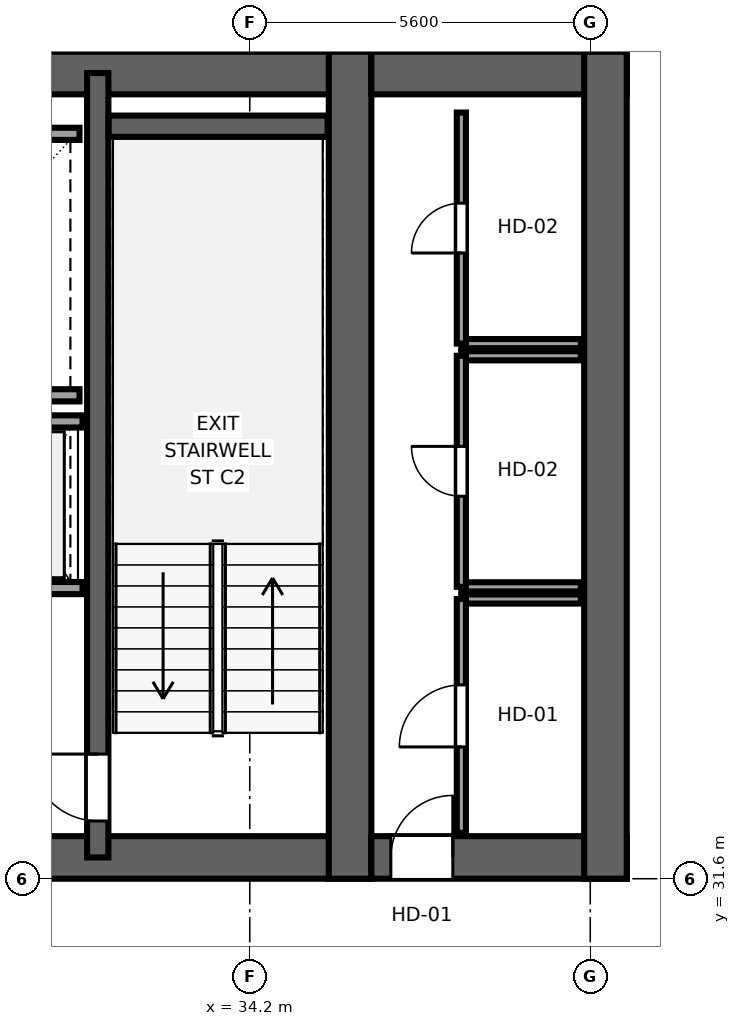
"""IFC4 building model, lengths in metres.
Left out: names, types, materials, properties, quantities, classifications, styles, units other than length and angle.
Written with IfcOpenShell. Run it as: python <this file> out.ifc"""

import sys

from ifc_helpers import new_model, si_unit, direction, frame, frame_2d, origin, place, context, subcontext, project, spatial, rectangle, extrude, source, transform, mapped, element, fill, save


model = new_model("IFC4")
c1 = context("Model", 3, precision=1e-05, world=origin(), true_north=direction((0.0, 1.0)))
c2 = subcontext(c1, "Body", "Model", "MODEL_VIEW")
j1 = project(units=[si_unit("LENGTHUNIT", "METRE"), si_unit("PLANEANGLEUNIT", "RADIAN")], contexts=[c1])
p1 = place(None, origin())
s1 = spatial("IfcSite", under=j1, at=p1, CompositionType="ELEMENT")
p2 = place(p1, origin())
s2 = spatial("IfcBuilding", under=s1, at=p2, CompositionType="ELEMENT")
p3 = place(p2, frame((0.0, 0.0, 100.9)))
s3 = spatial("IfcBuildingStorey", under=s2, at=p3, CompositionType="ELEMENT", Elevation=100.9)
p4 = place(p3, frame((9.8, 31.95, 0.0), z_axis=(0.0, 0.0, 1.0), x_axis=(1.0, 0.0, 0.0)))
e1 = element("IfcWall", 1, at=p4, inside=s3, PredefinedType="SHEAR", context=c2, shape_type="SweptSolid", body=[
    extrude(rectangle(XDim=26.4, YDim=0.7, at=frame_2d((13.2, 0.0))), origin(), (0.0, 0.0, 1.0), 3.55),
])
p5 = place(p4, frame((6.32, 0.0, 0.0), z_axis=(0.0, 0.0, 1.0), x_axis=(-1.0, 0.0, 0.0)))
e2 = element("IfcOpeningElement", 2, at=p5, cuts=e1, PredefinedType="OPENING", context=c2, shape_type="SweptSolid", body=[
    extrude(rectangle(XDim=1.5, YDim=2.04, at=frame_2d((0.75, 1.02))), frame((0.0, 0.36, 0.0), z_axis=(0.0, -1.0, 0.0), x_axis=(1.0, 0.0, 0.0)), (0.0, 0.0, 1.0), 0.72),
])
p6 = place(p4, frame((13.95, 0.0, 0.0), z_axis=(0.0, 0.0, 1.0), x_axis=(-1.0, 0.0, 0.0)))
e3 = element("IfcOpeningElement", 3, at=p6, cuts=e1, PredefinedType="OPENING", context=c2, shape_type="SweptSolid", body=[
    extrude(rectangle(XDim=1.5, YDim=2.04, at=frame_2d((0.75, 1.02))), frame((0.0, 0.36, 0.0), z_axis=(0.0, -1.0, 0.0), x_axis=(1.0, 0.0, 0.0)), (0.0, 0.0, 1.0), 0.72),
])
p7 = place(p4, frame((20.25, 0.0, 0.0), z_axis=(0.0, 0.0, 1.0), x_axis=(-1.0, 0.0, 0.0)))
e4 = element("IfcOpeningElement", 4, at=p7, cuts=e1, PredefinedType="OPENING", context=c2, shape_type="SweptSolid", body=[
    extrude(rectangle(XDim=1.5, YDim=2.04, at=frame_2d((0.75, 1.02))), frame((0.0, 0.36, 0.0), z_axis=(0.0, -1.0, 0.0), x_axis=(1.0, 0.0, 0.0)), (0.0, 0.0, 1.0), 0.72),
])
p8 = place(p4, frame((8.37, 0.0, 0.0), z_axis=(0.0, 0.0, 1.0), x_axis=(-1.0, 0.0, 0.0)))
e5 = element("IfcOpeningElement", 5, at=p8, cuts=e1, PredefinedType="OPENING", context=c2, shape_type="SweptSolid", body=[
    extrude(rectangle(XDim=0.82, YDim=2.01, at=frame_2d((0.41, 1.005))), frame((0.0, 0.36, 0.0), z_axis=(0.0, -1.0, 0.0), x_axis=(1.0, 0.0, 0.0)), (0.0, 0.0, 1.0), 0.72),
])
p9 = place(p3, frame((9.8, 44.85, 0.0), z_axis=(0.0, 0.0, 1.0), x_axis=(1.0, 0.0, 0.0)))
e6 = element("IfcWall", 6, at=p9, inside=s3, PredefinedType="SHEAR", context=c2, shape_type="SweptSolid", body=[
    extrude(rectangle(XDim=26.4, YDim=0.7, at=frame_2d((13.2, 0.0))), origin(), (0.0, 0.0, 1.0), 3.55),
])
p10 = place(p3, frame((35.85, 31.6, 0.0), z_axis=(0.0, 0.0, 1.0), x_axis=(0.0, 1.0, 0.0)))
e7 = element("IfcWall", 7, at=p10, inside=s3, PredefinedType="SHEAR", context=c2, shape_type="SweptSolid", body=[
    extrude(rectangle(XDim=13.6, YDim=0.7, at=frame_2d((6.8, 0.0))), origin(), (0.0, 0.0, 1.0), 3.55),
])
p11 = place(p3, frame((31.7, 31.95, 0.0), z_axis=(0.0, 0.0, 1.0), x_axis=(0.0, 1.0, 0.0)))
e8 = element("IfcWall", 8, at=p11, inside=s3, PredefinedType="SHEAR", context=c2, shape_type="SweptSolid", body=[
    extrude(rectangle(XDim=12.9, YDim=0.35, at=frame_2d((6.45, 0.0))), origin(), (0.0, 0.0, 1.0), 3.55),
])
p12 = place(p11, frame((1.7, 0.0, 0.0), z_axis=(0.0, 0.0, 1.0), x_axis=(-1.0, 0.0, 0.0)))
e9 = element("IfcOpeningElement", 9, at=p12, cuts=e8, PredefinedType="OPENING", context=c2, shape_type="SweptSolid", body=[
    extrude(rectangle(XDim=1.1, YDim=2.12, at=frame_2d((0.55, 1.06))), frame((0.0, 0.185, 0.0), z_axis=(0.0, -1.0, 0.0), x_axis=(1.0, 0.0, 0.0)), (0.0, 0.0, 1.0), 0.37),
])
p13 = place(p3, frame((36.2, 31.95, 0.0), z_axis=(0.0, 0.0, 1.0), x_axis=(1.0, 0.0, 0.0)))
e10 = element("IfcWall", 10, at=p13, inside=s3, PredefinedType="SHEAR", context=c2, shape_type="SweptSolid", body=[
    extrude(rectangle(XDim=4.2, YDim=0.7, at=frame_2d((2.1, 0.0))), origin(), (0.0, 0.0, 1.0), 3.55),
])
p14 = place(p13, frame((1.34, 0.0, 0.0), z_axis=(0.0, 0.0, 1.0), x_axis=(-1.0, 0.0, 0.0)))
e11 = element("IfcOpeningElement", 11, at=p14, cuts=e10, PredefinedType="OPENING", context=c2, shape_type="SweptSolid", body=[
    extrude(rectangle(XDim=1.02, YDim=2.03, at=frame_2d((0.51, 1.015))), frame((0.0, 0.36, 0.0), z_axis=(0.0, -1.0, 0.0), x_axis=(1.0, 0.0, 0.0)), (0.0, 0.0, 1.0), 0.72),
])
p15 = place(p3, frame((36.2, 44.85, 0.0), z_axis=(0.0, 0.0, 1.0), x_axis=(1.0, 0.0, 0.0)))
e12 = element("IfcWall", 12, at=p15, inside=s3, PredefinedType="SHEAR", context=c2, shape_type="SweptSolid", body=[
    extrude(rectangle(XDim=4.2, YDim=0.7, at=frame_2d((2.1, 0.0))), origin(), (0.0, 0.0, 1.0), 3.55),
])
p16 = place(p3, frame((40.05, 31.6, 0.0), z_axis=(0.0, 0.0, 1.0), x_axis=(0.0, 1.0, 0.0)))
e13 = element("IfcWall", 13, at=p16, inside=s3, PredefinedType="SHEAR", context=c2, shape_type="SweptSolid", body=[
    extrude(rectangle(XDim=13.6, YDim=0.7, at=frame_2d((6.8, 0.0))), origin(), (0.0, 0.0, 1.0), 3.55),
])
p17 = place(p3, frame((31.88, 43.975, 0.0), z_axis=(0.0, 0.0, 1.0), x_axis=(1.0, 0.0, 0.0)))
e14 = element("IfcWall", 14, at=p17, inside=s3, PredefinedType="SHEAR", context=c2, shape_type="SweptSolid", body=[
    extrude(rectangle(XDim=3.6, YDim=0.35, at=frame_2d((1.8, 0.0))), origin(), (0.0, 0.0, 1.0), 3.55),
])
for number, where, z_axis, x_axis in (
    (15, (27.3, 39.55, 0.0), (0.0, 0.0, 1.0), (1.0, 0.0, 0.0)),
    (16, (27.3, 43.85, 0.0), (0.0, 0.0, 1.0), (1.0, 0.0, 0.0)),
):
    element("IfcWall", number, at=place(p3, frame(where, z_axis=z_axis, x_axis=x_axis)), inside=s3, PredefinedType="SOLIDWALL", context=c2, shape_type="SweptSolid", body=[
        extrude(rectangle(XDim=4.1, YDim=0.2, at=frame_2d((2.05, 0.0))), origin(), (0.0, 0.0, 1.0), 3.37),
    ])
p18 = place(p3, frame((27.375, 36.38, 0.0), z_axis=(0.0, 0.0, 1.0), x_axis=(1.0, 0.0, 0.0)))
e17 = element("IfcWall", 17, at=p18, inside=s3, PredefinedType="SOLIDWALL", context=c2, shape_type="SweptSolid", body=[
    extrude(rectangle(XDim=4.075, YDim=0.2, at=frame_2d((2.038, 0.0))), origin(), (0.0, 0.0, 1.0), 3.37),
])
p19 = place(p18, frame((0.525, 0.0, 0.0)))
e18 = element("IfcOpeningElement", 18, at=p19, cuts=e17, PredefinedType="OPENING", context=c2, shape_type="SweptSolid", body=[
    extrude(rectangle(XDim=1.1, YDim=2.12, at=frame_2d((0.55, 1.06))), frame((0.0, 0.11, 0.0), z_axis=(0.0, -1.0, 0.0), x_axis=(1.0, 0.0, 0.0)), (0.0, 0.0, 1.0), 0.22),
])
p20 = place(p18, frame((2.425, 0.0, 0.0)))
e19 = element("IfcOpeningElement", 19, at=p20, cuts=e17, PredefinedType="OPENING", context=c2, shape_type="SweptSolid", body=[
    extrude(rectangle(XDim=1.1, YDim=2.12, at=frame_2d((0.55, 1.06))), frame((0.0, 0.11, 0.0), z_axis=(0.0, -1.0, 0.0), x_axis=(1.0, 0.0, 0.0)), (0.0, 0.0, 1.0), 0.22),
])
p21 = place(p3, frame((27.375, 39.12, 0.0), z_axis=(0.0, 0.0, 1.0), x_axis=(1.0, 0.0, 0.0)))
e20 = element("IfcWall", 20, at=p21, inside=s3, PredefinedType="SOLIDWALL", context=c2, shape_type="SweptSolid", body=[
    extrude(rectangle(XDim=4.075, YDim=0.2, at=frame_2d((2.038, 0.0))), origin(), (0.0, 0.0, 1.0), 3.37),
])
p22 = place(p3, frame((37.68, 36.2, 0.0), z_axis=(0.0, 0.0, 1.0), x_axis=(1.0, 0.0, 0.0)))
e21 = element("IfcWall", 21, at=p22, inside=s3, PredefinedType="PARTITIONING", context=c2, shape_type="SweptSolid", body=[
    extrude(rectangle(XDim=1.965, YDim=0.15, at=frame_2d((0.982, 0.0))), origin(), (0.0, 0.0, 1.0), 3.37),
])
p23 = place(p3, frame((37.68, 32.355, 0.0), z_axis=(0.0, 0.0, 1.0), x_axis=(0.0, 1.0, 0.0)))
e22 = element("IfcWall", 22, at=p23, inside=s3, PredefinedType="PARTITIONING", context=c2, shape_type="SweptSolid", body=[
    extrude(rectangle(XDim=3.845, YDim=0.15, at=frame_2d((1.922, 0.0))), origin(), (0.0, 0.0, 1.0), 3.37),
])
p24 = place(p23, frame((1.413, 0.0, 0.0)))
e23 = element("IfcOpeningElement", 23, at=p24, cuts=e22, PredefinedType="OPENING", context=c2, shape_type="SweptSolid", body=[
    extrude(rectangle(XDim=1.02, YDim=2.03, at=frame_2d((0.51, 1.015))), frame((0.0, 0.085, 0.0), z_axis=(0.0, -1.0, 0.0), x_axis=(1.0, 0.0, 0.0)), (0.0, 0.0, 1.0), 0.17),
])
for number, where, z_axis, x_axis in (
    (24, (37.68, 36.4, 0.0), (0.0, 0.0, 1.0), (1.0, 0.0, 0.0)),
    (25, (37.68, 40.2, 0.0), (0.0, 0.0, 1.0), (1.0, 0.0, 0.0)),
):
    element("IfcWall", number, at=place(p3, frame(where, z_axis=z_axis, x_axis=x_axis)), inside=s3, PredefinedType="PARTITIONING", context=c2, shape_type="SweptSolid", body=[
        extrude(rectangle(XDim=1.965, YDim=0.15, at=frame_2d((0.982, 0.0))), origin(), (0.0, 0.0, 1.0), 3.37),
    ])
p25 = place(p3, frame((37.68, 36.4, 0.0), z_axis=(0.0, 0.0, 1.0), x_axis=(0.0, 1.0, 0.0)))
e26 = element("IfcWall", 26, at=p25, inside=s3, PredefinedType="PARTITIONING", context=c2, shape_type="SweptSolid", body=[
    extrude(rectangle(XDim=3.8, YDim=0.15, at=frame_2d((1.9, 0.0))), origin(), (0.0, 0.0, 1.0), 3.37),
])
p26 = place(p25, frame((1.49, 0.0, 0.0)))
e27 = element("IfcOpeningElement", 27, at=p26, cuts=e26, PredefinedType="OPENING", context=c2, shape_type="SweptSolid", body=[
    extrude(rectangle(XDim=0.82, YDim=2.01, at=frame_2d((0.41, 1.005))), frame((0.0, 0.085, 0.0), z_axis=(0.0, -1.0, 0.0), x_axis=(1.0, 0.0, 0.0)), (0.0, 0.0, 1.0), 0.17),
])
p27 = place(p3, frame((37.68, 40.4, 0.0), z_axis=(0.0, 0.0, 1.0), x_axis=(1.0, 0.0, 0.0)))
e28 = element("IfcWall", 28, at=p27, inside=s3, PredefinedType="PARTITIONING", context=c2, shape_type="SweptSolid", body=[
    extrude(rectangle(XDim=1.965, YDim=0.15, at=frame_2d((0.982, 0.0))), origin(), (0.0, 0.0, 1.0), 3.37),
])
p28 = place(p3, frame((37.68, 40.4, 0.0), z_axis=(0.0, 0.0, 1.0), x_axis=(0.0, 1.0, 0.0)))
e29 = element("IfcWall", 29, at=p28, inside=s3, PredefinedType="PARTITIONING", context=c2, shape_type="SweptSolid", body=[
    extrude(rectangle(XDim=3.8, YDim=0.15, at=frame_2d((1.9, 0.0))), origin(), (0.0, 0.0, 1.0), 3.37),
])
p29 = place(p28, frame((1.49, 0.0, 0.0)))
e30 = element("IfcOpeningElement", 30, at=p29, cuts=e29, PredefinedType="OPENING", context=c2, shape_type="SweptSolid", body=[
    extrude(rectangle(XDim=0.82, YDim=2.01, at=frame_2d((0.41, 1.005))), frame((0.0, 0.085, 0.0), z_axis=(0.0, -1.0, 0.0), x_axis=(1.0, 0.0, 0.0)), (0.0, 0.0, 1.0), 0.17),
])
m1 = source(origin(), c2, "Body", "SweptSolid", [
    extrude(rectangle(XDim=1.1, YDim=2.12, at=frame_2d((0.55, 1.06))), frame((0.0, 0.025, 0.0), z_axis=(0.0, -1.0, 0.0), x_axis=(1.0, 0.0, 0.0)), (0.0, 0.0, 1.0), 0.05),
])
p30 = place(p12, origin())
e31 = element("IfcDoor", 31, at=p30, inside=s3, OperationType="SINGLE_SWING_RIGHT", PredefinedType="DOOR", context=c2, shape_type="MappedRepresentation", body=[
    mapped(m1, transform((0.0, 0.0, 0.0), x_axis=(1.0, 0.0, 0.0), y_axis=(0.0, 1.0, 0.0), z_axis=(0.0, 0.0, 1.0), scale=1.0)),
])
fill(e9, e31)
m2 = source(origin(), c2, "Body", "SweptSolid", [
    extrude(rectangle(XDim=1.02, YDim=2.03, at=frame_2d((0.51, 1.015))), frame((0.0, 0.025, 0.0), z_axis=(0.0, -1.0, 0.0), x_axis=(1.0, 0.0, 0.0)), (0.0, 0.0, 1.0), 0.05),
])
p31 = place(p14, origin())
e32 = element("IfcDoor", 32, at=p31, inside=s3, OperationType="SINGLE_SWING_RIGHT", PredefinedType="DOOR", context=c2, shape_type="MappedRepresentation", body=[
    mapped(m2, transform((0.0, 0.0, 0.0), x_axis=(1.0, 0.0, 0.0), y_axis=(0.0, 1.0, 0.0), z_axis=(0.0, 0.0, 1.0), scale=1.0)),
])
fill(e11, e32)
p32 = place(p24, origin())
e33 = element("IfcDoor", 33, at=p32, inside=s3, OperationType="SINGLE_SWING_LEFT", PredefinedType="DOOR", context=c2, shape_type="MappedRepresentation", body=[
    mapped(m2, transform((0.0, 0.0, 0.0), x_axis=(1.0, 0.0, 0.0), y_axis=(0.0, 1.0, 0.0), z_axis=(0.0, 0.0, 1.0), scale=1.0)),
])
fill(e23, e33)
m3 = source(origin(), c2, "Body", "SweptSolid", [
    extrude(rectangle(XDim=0.82, YDim=2.01, at=frame_2d((0.41, 1.005))), frame((0.0, 0.025, 0.0), z_axis=(0.0, -1.0, 0.0), x_axis=(1.0, 0.0, 0.0)), (0.0, 0.0, 1.0), 0.05),
])
p33 = place(p26, origin())
e34 = element("IfcDoor", 34, at=p33, inside=s3, OperationType="SINGLE_SWING_RIGHT", PredefinedType="DOOR", context=c2, shape_type="MappedRepresentation", body=[
    mapped(m3, transform((0.0, 0.0, 0.0), x_axis=(1.0, 0.0, 0.0), y_axis=(0.0, 1.0, 0.0), z_axis=(0.0, 0.0, 1.0), scale=1.0)),
])
fill(e27, e34)
p34 = place(p29, origin())
e35 = element("IfcDoor", 35, at=p34, inside=s3, OperationType="SINGLE_SWING_LEFT", PredefinedType="DOOR", context=c2, shape_type="MappedRepresentation", body=[
    mapped(m3, transform((0.0, 0.0, 0.0), x_axis=(1.0, 0.0, 0.0), y_axis=(0.0, 1.0, 0.0), z_axis=(0.0, 0.0, 1.0), scale=1.0)),
])
fill(e30, e35)
save(model, sys.argv[1])
